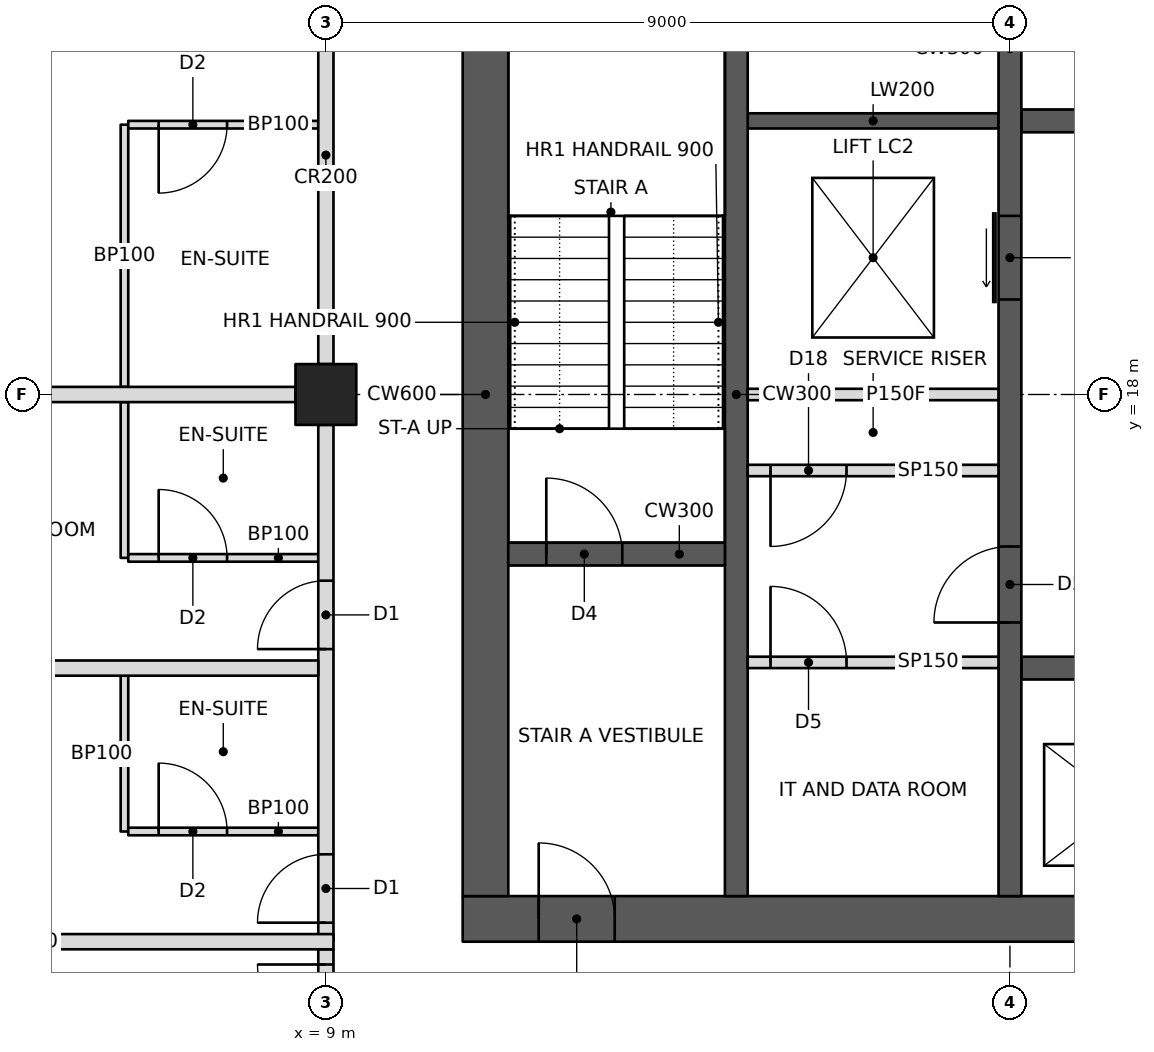
"""IFC4 building model, lengths in metres.
Left out: names, types, materials, properties, quantities, classifications, styles, units other than length and angle.
Written with IfcOpenShell. Run it as: python <this file> out.ifc"""

import sys

from ifc_helpers import new_model, si_unit, direction, frame, frame_2d, origin, origin_2d, place, context, subcontext, project, spatial, rectangle, hollow_rectangle, extrude, element, fill, save


model = new_model("IFC4")
c1 = context("Model", 3, precision=1e-05, world=origin(), true_north=direction((0.0, 1.0)))
c2 = subcontext(c1, "Body", "Model", "MODEL_VIEW")
j1 = project(units=[si_unit("LENGTHUNIT", "METRE"), si_unit("PLANEANGLEUNIT", "RADIAN")], contexts=[c1])
p1 = place(None, origin())
s1 = spatial("IfcSite", under=j1, at=p1, CompositionType="ELEMENT")
p2 = place(p1, origin())
s2 = spatial("IfcBuilding", under=s1, at=p2, CompositionType="ELEMENT")
p3 = place(p2, frame((0.0, 0.0, 237.4)))
s3 = spatial("IfcBuildingStorey", under=s2, at=p3, CompositionType="ELEMENT", Elevation=237.4)
p4 = place(p3, frame((9.0, 18.0, 0.0), z_axis=(0.0, 0.0, 1.0), x_axis=(1.0, 0.0, 0.0)))
e1 = element("IfcColumn", 1, at=p4, inside=s3, PredefinedType="COLUMN", context=c2, shape_type="SweptSolid", body=[
    extrude(hollow_rectangle(XDim=0.8, YDim=0.8, WallThickness=0.04, at=origin_2d()), origin(), (0.0, 0.0, 1.0), 3.6),
])
p5 = place(p3, frame((10.8, 11.1, 0.0), z_axis=(0.0, 0.0, 1.0), x_axis=(1.0, 0.0, 0.0)))
e2 = element("IfcWall", 2, at=p5, inside=s3, PredefinedType="SHEAR", context=c2, shape_type="SweptSolid", body=[
    extrude(rectangle(XDim=23.4, YDim=0.6, at=frame_2d((11.7, 0.0))), origin(), (0.0, 0.0, 1.0), 3.6),
])
p6 = place(p5, frame((1.0, 0.0, 0.0)))
e3 = element("IfcOpeningElement", 3, at=p6, cuts=e2, PredefinedType="OPENING", context=c2, shape_type="SweptSolid", body=[
    extrude(rectangle(XDim=1.0, YDim=2.1, at=frame_2d((0.5, 1.05))), frame((0.0, 0.31, 0.0), z_axis=(0.0, -1.0, 0.0), x_axis=(1.0, 0.0, 0.0)), (0.0, 0.0, 1.0), 0.62),
])
p7 = place(p5, frame((17.2, 0.0, 0.0)))
e4 = element("IfcOpeningElement", 4, at=p7, cuts=e2, PredefinedType="OPENING", context=c2, shape_type="SweptSolid", body=[
    extrude(rectangle(XDim=1.8, YDim=2.1, at=frame_2d((0.9, 1.05))), frame((0.0, 0.31, 0.0), z_axis=(0.0, -1.0, 0.0), x_axis=(1.0, 0.0, 0.0)), (0.0, 0.0, 1.0), 0.62),
])
p8 = place(p3, frame((11.1, 11.4, 0.0), z_axis=(0.0, 0.0, 1.0), x_axis=(0.0, 1.0, 0.0)))
e5 = element("IfcWall", 5, at=p8, inside=s3, PredefinedType="SHEAR", context=c2, shape_type="SweptSolid", body=[
    extrude(rectangle(XDim=13.2, YDim=0.6, at=frame_2d((6.6, 0.0))), origin(), (0.0, 0.0, 1.0), 3.6),
])
p9 = place(p3, frame((14.4, 11.4, 0.0), z_axis=(0.0, 0.0, 1.0), x_axis=(0.0, 1.0, 0.0)))
e6 = element("IfcWall", 6, at=p9, inside=s3, PredefinedType="SHEAR", context=c2, shape_type="SweptSolid", body=[
    extrude(rectangle(XDim=13.2, YDim=0.3, at=frame_2d((6.6, 0.0))), origin(), (0.0, 0.0, 1.0), 3.6),
])
p10 = place(p3, frame((11.4, 15.9, 0.0), z_axis=(0.0, 0.0, 1.0), x_axis=(1.0, 0.0, 0.0)))
e7 = element("IfcWall", 7, at=p10, inside=s3, PredefinedType="SHEAR", context=c2, shape_type="SweptSolid", body=[
    extrude(rectangle(XDim=2.85, YDim=0.3, at=frame_2d((1.425, 0.0))), origin(), (0.0, 0.0, 1.0), 3.6),
])
p11 = place(p10, frame((0.5, 0.0, 0.0)))
e8 = element("IfcOpeningElement", 8, at=p11, cuts=e7, PredefinedType="OPENING", context=c2, shape_type="SweptSolid", body=[
    extrude(rectangle(XDim=1.0, YDim=2.1, at=frame_2d((0.5, 1.05))), frame((0.0, 0.16, 0.0), z_axis=(0.0, -1.0, 0.0), x_axis=(1.0, 0.0, 0.0)), (0.0, 0.0, 1.0), 0.32),
])
p12 = place(p3, frame((18.0, 11.4, 0.0), z_axis=(0.0, 0.0, 1.0), x_axis=(0.0, 1.0, 0.0)))
e9 = element("IfcWall", 9, at=p12, inside=s3, PredefinedType="SHEAR", context=c2, shape_type="SweptSolid", body=[
    extrude(rectangle(XDim=13.2, YDim=0.3, at=frame_2d((6.6, 0.0))), origin(), (0.0, 0.0, 1.0), 3.6),
])
p13 = place(p12, frame((3.6, 0.0, 0.0)))
e10 = element("IfcOpeningElement", 10, at=p13, cuts=e9, PredefinedType="OPENING", context=c2, shape_type="SweptSolid", body=[
    extrude(rectangle(XDim=1.0, YDim=2.1, at=frame_2d((0.5, 1.05))), frame((0.0, 0.16, 0.0), z_axis=(0.0, -1.0, 0.0), x_axis=(1.0, 0.0, 0.0)), (0.0, 0.0, 1.0), 0.32),
])
p14 = place(p12, frame((7.85, 0.0, 0.0)))
e11 = element("IfcOpeningElement", 11, at=p14, cuts=e9, PredefinedType="OPENING", context=c2, shape_type="SweptSolid", body=[
    extrude(rectangle(XDim=1.1, YDim=2.1, at=frame_2d((0.55, 1.05))), frame((0.0, 0.16, 0.0), z_axis=(0.0, -1.0, 0.0), x_axis=(1.0, 0.0, 0.0)), (0.0, 0.0, 1.0), 0.32),
])
p15 = place(p3, frame((14.55, 18.0, 0.0), z_axis=(0.0, 0.0, 1.0), x_axis=(1.0, 0.0, 0.0)))
e12 = element("IfcWall", 12, at=p15, inside=s3, PredefinedType="PARTITIONING", context=c2, shape_type="SweptSolid", body=[
    extrude(rectangle(XDim=3.3, YDim=0.15, at=frame_2d((1.65, 0.0))), origin(), (0.0, 0.0, 1.0), 3.4),
])
p16 = place(p3, frame((18.15, 14.4, 0.0), z_axis=(0.0, 0.0, 1.0), x_axis=(1.0, 0.0, 0.0)))
e13 = element("IfcWall", 13, at=p16, inside=s3, PredefinedType="SHEAR", context=c2, shape_type="SweptSolid", body=[
    extrude(rectangle(XDim=9.0, YDim=0.3, at=frame_2d((4.5, 0.0))), origin(), (0.0, 0.0, 1.0), 3.6),
])
p17 = place(p16, frame((0.8, 0.0, 0.0)))
e14 = element("IfcOpeningElement", 14, at=p17, cuts=e13, PredefinedType="OPENING", context=c2, shape_type="SweptSolid", body=[
    extrude(rectangle(XDim=1.1, YDim=2.1, at=frame_2d((0.55, 1.05))), frame((0.0, 0.16, 0.0), z_axis=(0.0, -1.0, 0.0), x_axis=(1.0, 0.0, 0.0)), (0.0, 0.0, 1.0), 0.32),
])
p18 = place(p16, frame((6.75, 0.0, 0.0)))
e15 = element("IfcOpeningElement", 15, at=p18, cuts=e13, PredefinedType="OPENING", context=c2, shape_type="SweptSolid", body=[
    extrude(rectangle(XDim=1.2, YDim=2.1, at=frame_2d((0.6, 1.05))), frame((0.0, 0.16, 0.0), z_axis=(0.0, -1.0, 0.0), x_axis=(1.0, 0.0, 0.0)), (0.0, 0.0, 1.0), 0.32),
])
p19 = place(p16, frame((3.8, 0.0, 0.0)))
e16 = element("IfcOpeningElement", 16, at=p19, cuts=e13, PredefinedType="OPENING", context=c2, shape_type="SweptSolid", body=[
    extrude(rectangle(XDim=1.1, YDim=2.1, at=frame_2d((0.55, 1.05))), frame((0.0, 0.16, 0.0), z_axis=(0.0, -1.0, 0.0), x_axis=(1.0, 0.0, 0.0)), (0.0, 0.0, 1.0), 0.32),
])
p20 = place(p3, frame((18.15, 21.6, 0.0), z_axis=(0.0, 0.0, 1.0), x_axis=(1.0, 0.0, 0.0)))
e17 = element("IfcWall", 17, at=p20, inside=s3, PredefinedType="SHEAR", context=c2, shape_type="SweptSolid", body=[
    extrude(rectangle(XDim=9.0, YDim=0.3, at=frame_2d((4.5, 0.0))), origin(), (0.0, 0.0, 1.0), 3.6),
])
p21 = place(p20, frame((6.75, 0.0, 0.0)))
e18 = element("IfcOpeningElement", 18, at=p21, cuts=e17, PredefinedType="OPENING", context=c2, shape_type="SweptSolid", body=[
    extrude(rectangle(XDim=1.2, YDim=2.1, at=frame_2d((0.6, 1.05))), frame((0.0, 0.16, 0.0), z_axis=(0.0, -1.0, 0.0), x_axis=(1.0, 0.0, 0.0)), (0.0, 0.0, 1.0), 0.32),
])
p22 = place(p20, frame((0.8, 0.0, 0.0)))
e19 = element("IfcOpeningElement", 19, at=p22, cuts=e17, PredefinedType="OPENING", context=c2, shape_type="SweptSolid", body=[
    extrude(rectangle(XDim=1.1, YDim=2.1, at=frame_2d((0.55, 1.05))), frame((0.0, 0.16, 0.0), z_axis=(0.0, -1.0, 0.0), x_axis=(1.0, 0.0, 0.0)), (0.0, 0.0, 1.0), 0.32),
])
p23 = place(p20, frame((3.8, 0.0, 0.0)))
e20 = element("IfcOpeningElement", 20, at=p23, cuts=e17, PredefinedType="OPENING", context=c2, shape_type="SweptSolid", body=[
    extrude(rectangle(XDim=1.1, YDim=2.1, at=frame_2d((0.55, 1.05))), frame((0.0, 0.16, 0.0), z_axis=(0.0, -1.0, 0.0), x_axis=(1.0, 0.0, 0.0)), (0.0, 0.0, 1.0), 0.32),
])
p24 = place(p3, frame((14.55, 21.6, 0.0), z_axis=(0.0, 0.0, 1.0), x_axis=(1.0, 0.0, 0.0)))
e21 = element("IfcWall", 21, at=p24, inside=s3, PredefinedType="SHEAR", context=c2, shape_type="SweptSolid", body=[
    extrude(rectangle(XDim=3.3, YDim=0.2, at=frame_2d((1.65, 0.0))), origin(), (0.0, 0.0, 1.0), 3.6),
])
p25 = place(p3, frame((9.0, 10.8, 0.0), z_axis=(0.0, 0.0, 1.0), x_axis=(0.0, 1.0, 0.0)))
e22 = element("IfcWall", 22, at=p25, inside=s3, PredefinedType="PARTITIONING", context=c2, shape_type="SweptSolid", body=[
    extrude(rectangle(XDim=6.8, YDim=0.2, at=frame_2d((3.4, 0.0))), origin(), (0.0, 0.0, 1.0), 2.605),
])
p26 = place(p25, frame((0.25, 0.0, 0.0)))
e23 = element("IfcOpeningElement", 23, at=p26, cuts=e22, PredefinedType="OPENING", context=c2, shape_type="SweptSolid", body=[
    extrude(rectangle(XDim=0.9, YDim=2.1, at=frame_2d((0.45, 1.05))), frame((0.0, 0.11, 0.0), z_axis=(0.0, -1.0, 0.0), x_axis=(1.0, 0.0, 0.0)), (0.0, 0.0, 1.0), 0.22),
])
p27 = place(p25, frame((3.85, 0.0, 0.0)))
e24 = element("IfcOpeningElement", 24, at=p27, cuts=e22, PredefinedType="OPENING", context=c2, shape_type="SweptSolid", body=[
    extrude(rectangle(XDim=0.9, YDim=2.1, at=frame_2d((0.45, 1.05))), frame((0.0, 0.11, 0.0), z_axis=(0.0, -1.0, 0.0), x_axis=(1.0, 0.0, 0.0)), (0.0, 0.0, 1.0), 0.22),
])
p28 = place(p3, frame((9.0, 18.4, 0.0), z_axis=(0.0, 0.0, 1.0), x_axis=(0.0, 1.0, 0.0)))
e25 = element("IfcWall", 25, at=p28, inside=s3, PredefinedType="PARTITIONING", context=c2, shape_type="SweptSolid", body=[
    extrude(rectangle(XDim=6.8, YDim=0.2, at=frame_2d((3.4, 0.0))), origin(), (0.0, 0.0, 1.0), 2.605),
])
p29 = place(p28, frame((5.65, 0.0, 0.0)))
e26 = element("IfcOpeningElement", 26, at=p29, cuts=e25, PredefinedType="OPENING", context=c2, shape_type="SweptSolid", body=[
    extrude(rectangle(XDim=0.9, YDim=2.1, at=frame_2d((0.45, 1.05))), frame((0.0, 0.11, 0.0), z_axis=(0.0, -1.0, 0.0), x_axis=(1.0, 0.0, 0.0)), (0.0, 0.0, 1.0), 0.22),
])
p30 = place(p3, frame((1.0, 10.8, 0.0), z_axis=(0.0, 0.0, 1.0), x_axis=(1.0, 0.0, 0.0)))
e27 = element("IfcWall", 27, at=p30, inside=s3, PredefinedType="PARTITIONING", context=c2, shape_type="SweptSolid", body=[
    extrude(rectangle(XDim=8.1, YDim=0.2, at=frame_2d((4.05, 0.0))), origin(), (0.0, 0.0, 1.0), 2.604),
])
p31 = place(p3, frame((8.9, 14.4, 0.0), z_axis=(0.0, 0.0, 1.0), x_axis=(-1.0, 0.0, 0.0)))
e28 = element("IfcWall", 28, at=p31, inside=s3, PredefinedType="PARTITIONING", context=c2, shape_type="SweptSolid", body=[
    extrude(rectangle(XDim=7.9, YDim=0.2, at=frame_2d((3.95, 0.0))), origin(), (0.0, 0.0, 1.0), 2.604),
])
p32 = place(p3, frame((8.6, 18.0, 0.0), z_axis=(0.0, 0.0, 1.0), x_axis=(-1.0, 0.0, 0.0)))
e29 = element("IfcWall", 29, at=p32, inside=s3, PredefinedType="PARTITIONING", context=c2, shape_type="SweptSolid", body=[
    extrude(rectangle(XDim=7.6, YDim=0.2, at=frame_2d((3.8, 0.0))), origin(), (0.0, 0.0, 1.0), 2.605),
])
p33 = place(p3, frame((6.35, 12.25, 0.0), z_axis=(0.0, 0.0, 1.0), x_axis=(0.0, 1.0, 0.0)))
e30 = element("IfcWall", 30, at=p33, inside=s3, PredefinedType="PARTITIONING", context=c2, shape_type="SweptSolid", body=[
    extrude(rectangle(XDim=2.05, YDim=0.1, at=frame_2d((1.025, 0.0))), origin(), (0.0, 0.0, 1.0), 3.4),
])
p34 = place(p3, frame((8.9, 12.25, 0.0), z_axis=(0.0, 0.0, 1.0), x_axis=(-1.0, 0.0, 0.0)))
e31 = element("IfcWall", 31, at=p34, inside=s3, PredefinedType="PARTITIONING", context=c2, shape_type="SweptSolid", body=[
    extrude(rectangle(XDim=2.5, YDim=0.1, at=frame_2d((1.25, 0.0))), origin(), (0.0, 0.0, 1.0), 2.604),
])
p35 = place(p34, frame((1.2, 0.0, 0.0)))
e32 = element("IfcOpeningElement", 32, at=p35, cuts=e31, PredefinedType="OPENING", context=c2, shape_type="SweptSolid", body=[
    extrude(rectangle(XDim=0.9, YDim=2.1, at=frame_2d((0.45, 1.05))), frame((0.0, 0.06, 0.0), z_axis=(0.0, -1.0, 0.0), x_axis=(1.0, 0.0, 0.0)), (0.0, 0.0, 1.0), 0.12),
])
p36 = place(p3, frame((6.35, 15.85, 0.0), z_axis=(0.0, 0.0, 1.0), x_axis=(0.0, 1.0, 0.0)))
e33 = element("IfcWall", 33, at=p36, inside=s3, PredefinedType="PARTITIONING", context=c2, shape_type="SweptSolid", body=[
    extrude(rectangle(XDim=2.05, YDim=0.1, at=frame_2d((1.025, 0.0))), origin(), (0.0, 0.0, 1.0), 2.604),
])
p37 = place(p3, frame((8.9, 15.85, 0.0), z_axis=(0.0, 0.0, 1.0), x_axis=(-1.0, 0.0, 0.0)))
e34 = element("IfcWall", 34, at=p37, inside=s3, PredefinedType="PARTITIONING", context=c2, shape_type="SweptSolid", body=[
    extrude(rectangle(XDim=2.5, YDim=0.1, at=frame_2d((1.25, 0.0))), origin(), (0.0, 0.0, 1.0), 2.604),
])
p38 = place(p37, frame((1.2, 0.0, 0.0)))
e35 = element("IfcOpeningElement", 35, at=p38, cuts=e34, PredefinedType="OPENING", context=c2, shape_type="SweptSolid", body=[
    extrude(rectangle(XDim=0.9, YDim=2.1, at=frame_2d((0.45, 1.05))), frame((0.0, 0.06, 0.0), z_axis=(0.0, -1.0, 0.0), x_axis=(1.0, 0.0, 0.0)), (0.0, 0.0, 1.0), 0.12),
])
p39 = place(p3, frame((6.35, 18.1, 0.0), z_axis=(0.0, 0.0, 1.0), x_axis=(0.0, 1.0, 0.0)))
e36 = element("IfcWall", 36, at=p39, inside=s3, PredefinedType="PARTITIONING", context=c2, shape_type="SweptSolid", body=[
    extrude(rectangle(XDim=3.45, YDim=0.1, at=frame_2d((1.725, 0.0))), origin(), (0.0, 0.0, 1.0), 2.604),
])
p40 = place(p3, frame((8.9, 21.55, 0.0), z_axis=(0.0, 0.0, 1.0), x_axis=(-1.0, 0.0, 0.0)))
e37 = element("IfcWall", 37, at=p40, inside=s3, PredefinedType="PARTITIONING", context=c2, shape_type="SweptSolid", body=[
    extrude(rectangle(XDim=2.5, YDim=0.1, at=frame_2d((1.25, 0.0))), origin(), (0.0, 0.0, 1.0), 2.604),
])
p41 = place(p40, frame((1.2, 0.0, 0.0)))
e38 = element("IfcOpeningElement", 38, at=p41, cuts=e37, PredefinedType="OPENING", context=c2, shape_type="SweptSolid", body=[
    extrude(rectangle(XDim=0.9, YDim=2.1, at=frame_2d((0.45, 1.05))), frame((0.0, 0.06, 0.0), z_axis=(0.0, -1.0, 0.0), x_axis=(1.0, 0.0, 0.0)), (0.0, 0.0, 1.0), 0.12),
])
p42 = place(p3, frame((9.0, 9.4, 0.0), z_axis=(0.0, 0.0, 1.0), x_axis=(0.0, 1.0, 0.0)))
e39 = element("IfcWall", 39, at=p42, inside=s3, PredefinedType="PARTITIONING", context=c2, shape_type="SweptSolid", body=[
    extrude(rectangle(XDim=1.3, YDim=0.2, at=frame_2d((0.65, 0.0))), origin(), (0.0, 0.0, 1.0), 2.605),
])
p43 = place(p42, frame((0.2, 0.0, 0.0)))
e40 = element("IfcOpeningElement", 40, at=p43, cuts=e39, PredefinedType="OPENING", context=c2, shape_type="SweptSolid", body=[
    extrude(rectangle(XDim=0.9, YDim=2.1, at=frame_2d((0.45, 1.05))), frame((0.0, 0.11, 0.0), z_axis=(0.0, -1.0, 0.0), x_axis=(1.0, 0.0, 0.0)), (0.0, 0.0, 1.0), 0.22),
])
p44 = place(p3, frame((14.55, 17.0, 0.0), z_axis=(0.0, 0.0, 1.0), x_axis=(1.0, 0.0, 0.0)))
e41 = element("IfcWall", 41, at=p44, inside=s3, PredefinedType="PARTITIONING", context=c2, shape_type="SweptSolid", body=[
    extrude(rectangle(XDim=3.3, YDim=0.15, at=frame_2d((1.65, 0.0))), origin(), (0.0, 0.0, 1.0), 3.4),
])
p45 = place(p44, frame((0.3, 0.0, 0.0)))
e42 = element("IfcOpeningElement", 42, at=p45, cuts=e41, PredefinedType="OPENING", context=c2, shape_type="SweptSolid", body=[
    extrude(rectangle(XDim=1.0, YDim=2.1, at=frame_2d((0.5, 1.05))), frame((0.0, 0.085, 0.0), z_axis=(0.0, -1.0, 0.0), x_axis=(1.0, 0.0, 0.0)), (0.0, 0.0, 1.0), 0.17),
])
p46 = place(p3, frame((14.55, 14.475, 0.0), z_axis=(0.0, 0.0, 1.0), x_axis=(1.0, 0.0, 0.0)))
e43 = element("IfcWall", 43, at=p46, inside=s3, PredefinedType="PARTITIONING", context=c2, shape_type="SweptSolid", body=[
    extrude(rectangle(XDim=3.3, YDim=0.15, at=frame_2d((1.65, 0.0))), origin(), (0.0, 0.0, 1.0), 3.4),
])
p47 = place(p46, frame((0.3, 0.0, 0.0)))
e44 = element("IfcOpeningElement", 44, at=p47, cuts=e43, PredefinedType="OPENING", context=c2, shape_type="SweptSolid", body=[
    extrude(rectangle(XDim=1.0, YDim=2.1, at=frame_2d((0.5, 1.05))), frame((0.0, 0.085, 0.0), z_axis=(0.0, -1.0, 0.0), x_axis=(1.0, 0.0, 0.0)), (0.0, 0.0, 1.0), 0.17),
])
p48 = place(p35, frame((0.9, 0.0, 0.0), z_axis=(0.0, 0.0, 1.0), x_axis=(-1.0, 0.0, 0.0)))
e45 = element("IfcDoor", 45, at=p48, inside=s3, OperationType="SINGLE_SWING_LEFT", PredefinedType="DOOR", context=c2, shape_type="SweptSolid", body=[
    extrude(rectangle(XDim=0.9, YDim=2.1, at=frame_2d((0.45, 1.05))), frame((0.0, 0.025, 0.0), z_axis=(0.0, -1.0, 0.0), x_axis=(1.0, 0.0, 0.0)), (0.0, 0.0, 1.0), 0.05),
])
fill(e32, e45)
p49 = place(p26, origin())
e46 = element("IfcDoor", 46, at=p49, inside=s3, OperationType="SINGLE_SWING_LEFT", PredefinedType="DOOR", context=c2, shape_type="SweptSolid", body=[
    extrude(rectangle(XDim=0.9, YDim=2.1, at=frame_2d((0.45, 1.05))), frame((0.0, 0.025, 0.0), z_axis=(0.0, -1.0, 0.0), x_axis=(1.0, 0.0, 0.0)), (0.0, 0.0, 1.0), 0.05),
])
fill(e23, e46)
p50 = place(p38, frame((0.9, 0.0, 0.0), z_axis=(0.0, 0.0, 1.0), x_axis=(-1.0, 0.0, 0.0)))
e47 = element("IfcDoor", 47, at=p50, inside=s3, OperationType="SINGLE_SWING_LEFT", PredefinedType="DOOR", context=c2, shape_type="SweptSolid", body=[
    extrude(rectangle(XDim=0.9, YDim=2.1, at=frame_2d((0.45, 1.05))), frame((0.0, 0.025, 0.0), z_axis=(0.0, -1.0, 0.0), x_axis=(1.0, 0.0, 0.0)), (0.0, 0.0, 1.0), 0.05),
])
fill(e35, e47)
p51 = place(p27, origin())
e48 = element("IfcDoor", 48, at=p51, inside=s3, OperationType="SINGLE_SWING_LEFT", PredefinedType="DOOR", context=c2, shape_type="SweptSolid", body=[
    extrude(rectangle(XDim=0.9, YDim=2.1, at=frame_2d((0.45, 1.05))), frame((0.0, 0.025, 0.0), z_axis=(0.0, -1.0, 0.0), x_axis=(1.0, 0.0, 0.0)), (0.0, 0.0, 1.0), 0.05),
])
fill(e24, e48)
p52 = place(p41, origin())
e49 = element("IfcDoor", 49, at=p52, inside=s3, OperationType="SINGLE_SWING_RIGHT", PredefinedType="DOOR", context=c2, shape_type="SweptSolid", body=[
    extrude(rectangle(XDim=0.9, YDim=2.1, at=frame_2d((0.45, 1.05))), frame((0.0, 0.025, 0.0), z_axis=(0.0, -1.0, 0.0), x_axis=(1.0, 0.0, 0.0)), (0.0, 0.0, 1.0), 0.05),
])
fill(e38, e49)
p53 = place(p43, origin())
e50 = element("IfcDoor", 50, at=p53, inside=s3, OperationType="SINGLE_SWING_RIGHT", PredefinedType="DOOR", context=c2, shape_type="SweptSolid", body=[
    extrude(rectangle(XDim=0.9, YDim=2.1, at=frame_2d((0.45, 1.05))), frame((0.0, 0.025, 0.0), z_axis=(0.0, -1.0, 0.0), x_axis=(1.0, 0.0, 0.0)), (0.0, 0.0, 1.0), 0.05),
])
fill(e40, e50)
p54 = place(p45, frame((1.0, 0.0, 0.0), z_axis=(0.0, 0.0, 1.0), x_axis=(-1.0, 0.0, 0.0)))
e51 = element("IfcDoor", 51, at=p54, inside=s3, OperationType="SINGLE_SWING_RIGHT", PredefinedType="DOOR", context=c2, shape_type="SweptSolid", body=[
    extrude(rectangle(XDim=1.0, YDim=2.1, at=frame_2d((0.5, 1.05))), frame((0.0, 0.025, 0.0), z_axis=(0.0, -1.0, 0.0), x_axis=(1.0, 0.0, 0.0)), (0.0, 0.0, 1.0), 0.05),
])
fill(e42, e51)
p55 = place(p47, origin())
e52 = element("IfcDoor", 52, at=p55, inside=s3, OperationType="SINGLE_SWING_LEFT", PredefinedType="DOOR", context=c2, shape_type="SweptSolid", body=[
    extrude(rectangle(XDim=1.0, YDim=2.1, at=frame_2d((0.5, 1.05))), frame((0.0, 0.025, 0.0), z_axis=(0.0, -1.0, 0.0), x_axis=(1.0, 0.0, 0.0)), (0.0, 0.0, 1.0), 0.05),
])
fill(e44, e52)
p56 = place(p6, origin())
e53 = element("IfcDoor", 53, at=p56, inside=s3, OperationType="SINGLE_SWING_LEFT", PredefinedType="DOOR", context=c2, shape_type="SweptSolid", body=[
    extrude(rectangle(XDim=1.0, YDim=2.1, at=frame_2d((0.5, 1.05))), frame((0.0, 0.025, 0.0), z_axis=(0.0, -1.0, 0.0), x_axis=(1.0, 0.0, 0.0)), (0.0, 0.0, 1.0), 0.05),
])
fill(e3, e53)
p57 = place(p11, origin())
e54 = element("IfcDoor", 54, at=p57, inside=s3, OperationType="SINGLE_SWING_LEFT", PredefinedType="DOOR", context=c2, shape_type="SweptSolid", body=[
    extrude(rectangle(XDim=1.0, YDim=2.1, at=frame_2d((0.5, 1.05))), frame((0.0, 0.025, 0.0), z_axis=(0.0, -1.0, 0.0), x_axis=(1.0, 0.0, 0.0)), (0.0, 0.0, 1.0), 0.05),
])
fill(e8, e54)
p58 = place(p13, origin())
e55 = element("IfcDoor", 55, at=p58, inside=s3, OperationType="SINGLE_SWING_LEFT", PredefinedType="DOOR", context=c2, shape_type="SweptSolid", body=[
    extrude(rectangle(XDim=1.0, YDim=2.1, at=frame_2d((0.5, 1.05))), frame((0.0, 0.025, 0.0), z_axis=(0.0, -1.0, 0.0), x_axis=(1.0, 0.0, 0.0)), (0.0, 0.0, 1.0), 0.05),
])
fill(e10, e55)
p59 = place(p14, origin())
e56 = element("IfcDoor", 56, at=p59, inside=s3, OperationType="SLIDING_TO_LEFT", PredefinedType="DOOR", context=c2, shape_type="SweptSolid", body=[
    extrude(rectangle(XDim=1.1, YDim=2.1, at=frame_2d((0.55, 1.05))), frame((0.0, 0.025, 0.0), z_axis=(0.0, -1.0, 0.0), x_axis=(1.0, 0.0, 0.0)), (0.0, 0.0, 1.0), 0.05),
])
fill(e11, e56)
save(model, sys.argv[1])
